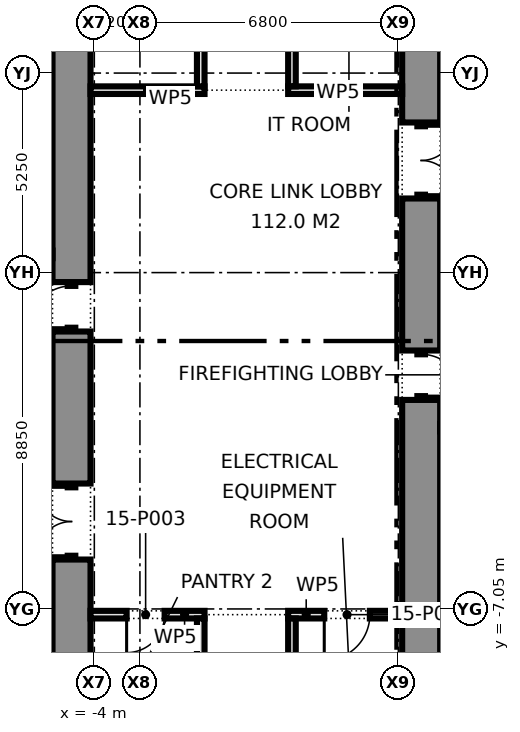
"""IFC4 building model, lengths in metres.
Left out: names, types, materials, properties, quantities, classifications, styles, units other than length and angle.
Written with IfcOpenShell. Run it as: python <this file> out.ifc"""

import sys

from ifc_helpers import new_model, si_unit, direction, frame, frame_2d, origin, place, context, subcontext, project, spatial, rectangle, extrude, element, fill, save


model = new_model("IFC4")
c1 = context("Model", 3, precision=1e-05, world=origin(), true_north=direction((0.0, 1.0)))
c2 = subcontext(c1, "Body", "Model", "MODEL_VIEW")
j1 = project(units=[si_unit("LENGTHUNIT", "METRE"), si_unit("PLANEANGLEUNIT", "RADIAN")], contexts=[c1])
p1 = place(None, origin())
s1 = spatial("IfcSite", under=j1, at=p1, CompositionType="ELEMENT")
p2 = place(p1, origin())
s2 = spatial("IfcBuilding", under=s1, at=p2, CompositionType="ELEMENT")
p3 = place(p2, frame((0.0, 0.0, 68.6)))
s3 = spatial("IfcBuildingStorey", under=s2, at=p3, CompositionType="ELEMENT", Elevation=68.6)
p4 = place(p3, frame((-4.6, -8.9, 0.0), z_axis=(0.0, 0.0, 1.0), x_axis=(0.0, 1.0, 0.0)))
e1 = element("IfcWall", 1, at=p4, inside=s3, PredefinedType="SHEAR", context=c2, shape_type="SweptSolid", body=[
    extrude(rectangle(XDim=3.15, YDim=1.0, at=frame_2d((1.575, 0.0))), origin(), (0.0, 0.0, 1.0), 4.4),
])
p5 = place(p3, frame((-4.6, -5.75, 0.0), z_axis=(0.0, 0.0, 1.0), x_axis=(0.0, 1.0, 0.0)))
e2 = element("IfcWall", 2, at=p5, inside=s3, PredefinedType="PARTITIONING", context=c2, shape_type="SweptSolid", body=[
    extrude(rectangle(XDim=2.0, YDim=0.2, at=frame_2d((1.0, 0.0))), origin(), (0.0, 0.0, 1.0), 2.4),
])
p6 = place(p5, frame((0.1, 0.0, 0.0)))
e3 = element("IfcOpeningElement", 3, at=p6, cuts=e2, PredefinedType="OPENING", context=c2, shape_type="SweptSolid", body=[
    extrude(rectangle(XDim=1.8, YDim=2.1, at=frame_2d((0.9, 1.05))), frame((0.0, 0.11, 0.0), z_axis=(0.0, -1.0, 0.0), x_axis=(1.0, 0.0, 0.0)), (0.0, 0.0, 1.0), 0.22),
])
p7 = place(p3, frame((-4.6, -3.75, 0.0), z_axis=(0.0, 0.0, 1.0), x_axis=(0.0, 1.0, 0.0)))
e4 = element("IfcWall", 4, at=p7, inside=s3, PredefinedType="SHEAR", context=c2, shape_type="SweptSolid", body=[
    extrude(rectangle(XDim=4.0, YDim=1.0, at=frame_2d((2.0, 0.0))), origin(), (0.0, 0.0, 1.0), 4.4),
])
p8 = place(p3, frame((-4.6, 0.25, 0.0), z_axis=(0.0, 0.0, 1.0), x_axis=(0.0, 1.0, 0.0)))
e5 = element("IfcWall", 5, at=p8, inside=s3, PredefinedType="PARTITIONING", context=c2, shape_type="SweptSolid", body=[
    extrude(rectangle(XDim=1.3, YDim=0.2, at=frame_2d((0.65, 0.0))), origin(), (0.0, 0.0, 1.0), 2.4),
])
p9 = place(p8, frame((0.1, 0.0, 0.0)))
e6 = element("IfcOpeningElement", 6, at=p9, cuts=e5, PredefinedType="OPENING", context=c2, shape_type="SweptSolid", body=[
    extrude(rectangle(XDim=1.1, YDim=2.1, at=frame_2d((0.55, 1.05))), frame((0.0, 0.11, 0.0), z_axis=(0.0, -1.0, 0.0), x_axis=(1.0, 0.0, 0.0)), (0.0, 0.0, 1.0), 0.22),
])
p10 = place(p3, frame((-4.6, 1.55, 0.0), z_axis=(0.0, 0.0, 1.0), x_axis=(0.0, 1.0, 0.0)))
e7 = element("IfcWall", 7, at=p10, inside=s3, PredefinedType="SHEAR", context=c2, shape_type="SweptSolid", body=[
    extrude(rectangle(XDim=7.35, YDim=1.0, at=frame_2d((3.675, 0.0))), origin(), (0.0, 0.0, 1.0), 4.4),
])
p11 = place(p3, frame((4.6, 8.9, 0.0), z_axis=(0.0, 0.0, 1.0), x_axis=(0.0, -1.0, 0.0)))
e8 = element("IfcWall", 8, at=p11, inside=s3, PredefinedType="SHEAR", context=c2, shape_type="SweptSolid", body=[
    extrude(rectangle(XDim=3.15, YDim=1.0, at=frame_2d((1.575, 0.0))), origin(), (0.0, 0.0, 1.0), 4.4),
])
p12 = place(p3, frame((4.6, 5.75, 0.0), z_axis=(0.0, 0.0, 1.0), x_axis=(0.0, -1.0, 0.0)))
e9 = element("IfcWall", 9, at=p12, inside=s3, PredefinedType="PARTITIONING", context=c2, shape_type="SweptSolid", body=[
    extrude(rectangle(XDim=2.0, YDim=0.2, at=frame_2d((1.0, 0.0))), origin(), (0.0, 0.0, 1.0), 2.4),
])
p13 = place(p12, frame((0.1, 0.0, 0.0)))
e10 = element("IfcOpeningElement", 10, at=p13, cuts=e9, PredefinedType="OPENING", context=c2, shape_type="SweptSolid", body=[
    extrude(rectangle(XDim=1.8, YDim=2.1, at=frame_2d((0.9, 1.05))), frame((0.0, 0.11, 0.0), z_axis=(0.0, -1.0, 0.0), x_axis=(1.0, 0.0, 0.0)), (0.0, 0.0, 1.0), 0.22),
])
p14 = place(p3, frame((4.6, 3.75, 0.0), z_axis=(0.0, 0.0, 1.0), x_axis=(0.0, -1.0, 0.0)))
e11 = element("IfcWall", 11, at=p14, inside=s3, PredefinedType="SHEAR", context=c2, shape_type="SweptSolid", body=[
    extrude(rectangle(XDim=4.0, YDim=1.0, at=frame_2d((2.0, 0.0))), origin(), (0.0, 0.0, 1.0), 4.4),
])
p15 = place(p3, frame((4.6, -0.25, 0.0), z_axis=(0.0, 0.0, 1.0), x_axis=(0.0, -1.0, 0.0)))
e12 = element("IfcWall", 12, at=p15, inside=s3, PredefinedType="PARTITIONING", context=c2, shape_type="SweptSolid", body=[
    extrude(rectangle(XDim=1.3, YDim=0.2, at=frame_2d((0.65, 0.0))), origin(), (0.0, 0.0, 1.0), 2.4),
])
p16 = place(p15, frame((0.1, 0.0, 0.0)))
e13 = element("IfcOpeningElement", 13, at=p16, cuts=e12, PredefinedType="OPENING", context=c2, shape_type="SweptSolid", body=[
    extrude(rectangle(XDim=1.1, YDim=2.1, at=frame_2d((0.55, 1.05))), frame((0.0, 0.11, 0.0), z_axis=(0.0, -1.0, 0.0), x_axis=(1.0, 0.0, 0.0)), (0.0, 0.0, 1.0), 0.22),
])
p17 = place(p3, frame((4.6, -1.55, 0.0), z_axis=(0.0, 0.0, 1.0), x_axis=(0.0, -1.0, 0.0)))
e14 = element("IfcWall", 14, at=p17, inside=s3, PredefinedType="SHEAR", context=c2, shape_type="SweptSolid", body=[
    extrude(rectangle(XDim=7.35, YDim=1.0, at=frame_2d((3.675, 0.0))), origin(), (0.0, 0.0, 1.0), 4.4),
])
p18 = place(p3, frame((-4.1, -7.2, 0.0), z_axis=(0.0, 0.0, 1.0), x_axis=(1.0, 0.0, 0.0)))
e15 = element("IfcWall", 15, at=p18, inside=s3, PredefinedType="PARTITIONING", context=c2, shape_type="SweptSolid", body=[
    extrude(rectangle(XDim=3.0, YDim=0.2, at=frame_2d((1.5, 0.0))), origin(), (0.0, 0.0, 1.0), 4.4),
])
p19 = place(p18, frame((0.95, 0.0, 0.0)))
e16 = element("IfcOpeningElement", 16, at=p19, cuts=e15, PredefinedType="OPENING", context=c2, shape_type="SweptSolid", body=[
    extrude(rectangle(XDim=1.0, YDim=2.1, at=frame_2d((0.5, 1.05))), frame((0.0, 0.11, 0.0), z_axis=(0.0, -1.0, 0.0), x_axis=(1.0, 0.0, 0.0)), (0.0, 0.0, 1.0), 0.22),
])
p20 = place(p3, frame((1.1, -7.2, 0.0), z_axis=(0.0, 0.0, 1.0), x_axis=(1.0, 0.0, 0.0)))
e17 = element("IfcWall", 17, at=p20, inside=s3, PredefinedType="PARTITIONING", context=c2, shape_type="SweptSolid", body=[
    extrude(rectangle(XDim=3.0, YDim=0.2, at=frame_2d((1.5, 0.0))), origin(), (0.0, 0.0, 1.0), 4.4),
])
p21 = place(p20, frame((0.95, 0.0, 0.0)))
e18 = element("IfcOpeningElement", 18, at=p21, cuts=e17, PredefinedType="OPENING", context=c2, shape_type="SweptSolid", body=[
    extrude(rectangle(XDim=1.2, YDim=2.1, at=frame_2d((0.6, 1.05))), frame((0.0, 0.11, 0.0), z_axis=(0.0, -1.0, 0.0), x_axis=(1.0, 0.0, 0.0)), (0.0, 0.0, 1.0), 0.22),
])
for number, where, z_axis, x_axis in (
    (19, (-4.1, 6.6, 0.0), (0.0, 0.0, 1.0), (1.0, 0.0, 0.0)),
    (20, (1.1, 6.6, 0.0), (0.0, 0.0, 1.0), (1.0, 0.0, 0.0)),
):
    element("IfcWall", number, at=place(p3, frame(where, z_axis=z_axis, x_axis=x_axis)), inside=s3, PredefinedType="PARTITIONING", context=c2, shape_type="SweptSolid", body=[
        extrude(rectangle(XDim=3.0, YDim=0.2, at=frame_2d((1.5, 0.0))), origin(), (0.0, 0.0, 1.0), 4.4),
    ])
p22 = place(p3, frame((1.2, -9.8, 0.0), z_axis=(0.0, 0.0, 1.0), x_axis=(0.0, 1.0, 0.0)))
e21 = element("IfcWall", 21, at=p22, inside=s3, PredefinedType="PARTITIONING", context=c2, shape_type="SweptSolid", body=[
    extrude(rectangle(XDim=2.5, YDim=0.2, at=frame_2d((1.25, 0.0))), origin(), (0.0, 0.0, 1.0), 4.4),
])
p23 = place(p3, frame((1.2, 6.7, 0.0), z_axis=(0.0, 0.0, 1.0), x_axis=(0.0, 1.0, 0.0)))
e22 = element("IfcWall", 22, at=p23, inside=s3, PredefinedType="PARTITIONING", context=c2, shape_type="SweptSolid", body=[
    extrude(rectangle(XDim=3.1, YDim=0.2, at=frame_2d((1.55, 0.0))), origin(), (0.0, 0.0, 1.0), 4.4),
])
p24 = place(p23, frame((1.05, 0.0, 0.0)))
e23 = element("IfcOpeningElement", 23, at=p24, cuts=e22, PredefinedType="OPENING", context=c2, shape_type="SweptSolid", body=[
    extrude(rectangle(XDim=1.0, YDim=2.1, at=frame_2d((0.5, 1.05))), frame((0.0, 0.11, 0.0), z_axis=(0.0, -1.0, 0.0), x_axis=(1.0, 0.0, 0.0)), (0.0, 0.0, 1.0), 0.22),
])
p25 = place(p3, frame((-1.2, -9.8, 0.0), z_axis=(0.0, 0.0, 1.0), x_axis=(0.0, 1.0, 0.0)))
e24 = element("IfcWall", 24, at=p25, inside=s3, PredefinedType="PARTITIONING", context=c2, shape_type="SweptSolid", body=[
    extrude(rectangle(XDim=2.5, YDim=0.2, at=frame_2d((1.25, 0.0))), origin(), (0.0, 0.0, 1.0), 4.4),
])
p26 = place(p3, frame((-1.2, 6.7, 0.0), z_axis=(0.0, 0.0, 1.0), x_axis=(0.0, 1.0, 0.0)))
e25 = element("IfcWall", 25, at=p26, inside=s3, PredefinedType="PARTITIONING", context=c2, shape_type="SweptSolid", body=[
    extrude(rectangle(XDim=3.1, YDim=0.2, at=frame_2d((1.55, 0.0))), origin(), (0.0, 0.0, 1.0), 4.4),
])
p27 = place(p26, frame((1.05, 0.0, 0.0)))
e26 = element("IfcOpeningElement", 26, at=p27, cuts=e25, PredefinedType="OPENING", context=c2, shape_type="SweptSolid", body=[
    extrude(rectangle(XDim=1.0, YDim=2.1, at=frame_2d((0.5, 1.05))), frame((0.0, 0.11, 0.0), z_axis=(0.0, -1.0, 0.0), x_axis=(1.0, 0.0, 0.0)), (0.0, 0.0, 1.0), 0.22),
])
p28 = place(p6, origin())
e27 = element("IfcDoor", 27, at=p28, inside=s3, OperationType="DOUBLE_DOOR_SINGLE_SWING", PredefinedType="DOOR", context=c2, shape_type="SweptSolid", body=[
    extrude(rectangle(XDim=1.8, YDim=2.1, at=frame_2d((0.9, 1.05))), frame((0.0, 0.025, 0.0), z_axis=(0.0, -1.0, 0.0), x_axis=(1.0, 0.0, 0.0)), (0.0, 0.0, 1.0), 0.05),
])
fill(e3, e27)
p29 = place(p9, origin())
e28 = element("IfcDoor", 28, at=p29, inside=s3, OperationType="SINGLE_SWING_LEFT", PredefinedType="DOOR", context=c2, shape_type="SweptSolid", body=[
    extrude(rectangle(XDim=1.1, YDim=2.1, at=frame_2d((0.55, 1.05))), frame((0.0, 0.025, 0.0), z_axis=(0.0, -1.0, 0.0), x_axis=(1.0, 0.0, 0.0)), (0.0, 0.0, 1.0), 0.05),
])
fill(e6, e28)
p30 = place(p13, origin())
e29 = element("IfcDoor", 29, at=p30, inside=s3, OperationType="DOUBLE_DOOR_SINGLE_SWING", PredefinedType="DOOR", context=c2, shape_type="SweptSolid", body=[
    extrude(rectangle(XDim=1.8, YDim=2.1, at=frame_2d((0.9, 1.05))), frame((0.0, 0.025, 0.0), z_axis=(0.0, -1.0, 0.0), x_axis=(1.0, 0.0, 0.0)), (0.0, 0.0, 1.0), 0.05),
])
fill(e10, e29)
p31 = place(p16, origin())
e30 = element("IfcDoor", 30, at=p31, inside=s3, OperationType="SINGLE_SWING_RIGHT", PredefinedType="DOOR", context=c2, shape_type="SweptSolid", body=[
    extrude(rectangle(XDim=1.1, YDim=2.1, at=frame_2d((0.55, 1.05))), frame((0.0, 0.025, 0.0), z_axis=(0.0, -1.0, 0.0), x_axis=(1.0, 0.0, 0.0)), (0.0, 0.0, 1.0), 0.05),
])
fill(e13, e30)
p32 = place(p19, frame((1.0, 0.0, 0.0), z_axis=(0.0, 0.0, 1.0), x_axis=(-1.0, 0.0, 0.0)))
e31 = element("IfcDoor", 31, at=p32, inside=s3, OperationType="SINGLE_SWING_RIGHT", PredefinedType="DOOR", context=c2, shape_type="SweptSolid", body=[
    extrude(rectangle(XDim=1.0, YDim=2.1, at=frame_2d((0.5, 1.05))), frame((0.0, 0.025, 0.0), z_axis=(0.0, -1.0, 0.0), x_axis=(1.0, 0.0, 0.0)), (0.0, 0.0, 1.0), 0.05),
])
fill(e16, e31)
p33 = place(p21, frame((1.2, 0.0, 0.0), z_axis=(0.0, 0.0, 1.0), x_axis=(-1.0, 0.0, 0.0)))
e32 = element("IfcDoor", 32, at=p33, inside=s3, OperationType="SINGLE_SWING_RIGHT", PredefinedType="DOOR", context=c2, shape_type="SweptSolid", body=[
    extrude(rectangle(XDim=1.2, YDim=2.1, at=frame_2d((0.6, 1.05))), frame((0.0, 0.025, 0.0), z_axis=(0.0, -1.0, 0.0), x_axis=(1.0, 0.0, 0.0)), (0.0, 0.0, 1.0), 0.05),
])
fill(e18, e32)
save(model, sys.argv[1])
